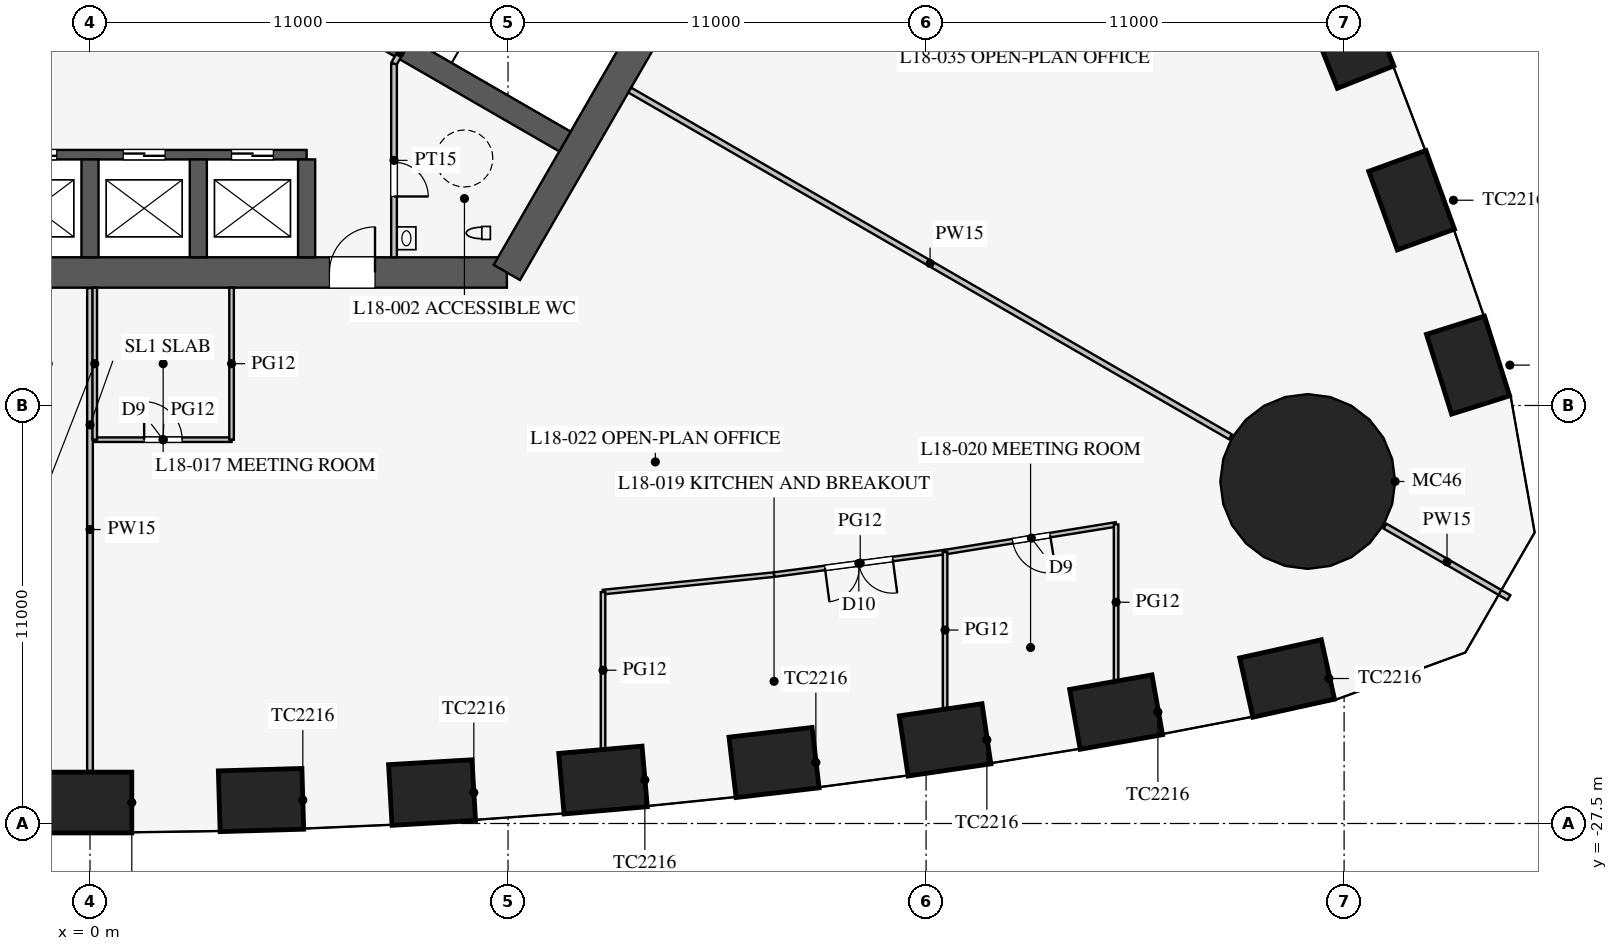
"""IFC4 building model, lengths in metres.
Left out: names, types, materials, properties, quantities, classifications, styles, units other than length and angle.
Written with IfcOpenShell. Run it as: python <this file> out.ifc"""

import sys

from ifc_helpers import new_model, si_unit, direction, frame, frame_2d, origin, origin_2d, place, context, subcontext, project, spatial, rectangle, circle, extrude, element, fill, save


model = new_model("IFC4")
c1 = context("Model", 3, precision=1e-05, world=origin(), true_north=direction((0.0, 1.0)))
c2 = subcontext(c1, "Body", "Model", "MODEL_VIEW")
j1 = project(units=[si_unit("LENGTHUNIT", "METRE"), si_unit("PLANEANGLEUNIT", "RADIAN")], contexts=[c1])
p1 = place(None, origin())
s1 = spatial("IfcSite", under=j1, at=p1, CompositionType="ELEMENT")
p2 = place(p1, origin())
s2 = spatial("IfcBuilding", under=s1, at=p2, CompositionType="ELEMENT")
p3 = place(p2, frame((0.0, 0.0, 79.5)))
s3 = spatial("IfcBuildingStorey", under=s2, at=p3, CompositionType="ELEMENT", Elevation=79.5)
for number, where, z_axis, x_axis in (
    (1, (0.0, -26.949, 0.0), (0.0, 0.0, 1.0), (1.0, 0.0, 0.0)),
    (2, (4.5, -26.883, 0.0), (0.0, 0.0, 1.0), (1.0, 0.029, 0.0)),
    (3, (9.0, -26.686, 0.0), (0.0, 0.0, 1.0), (0.998, 0.058, 0.0)),
    (4, (13.5, -26.357, 0.0), (0.0, 0.0, 1.0), (0.996, 0.087, 0.0)),
    (5, (18.0, -25.895, 0.0), (0.0, 0.0, 1.0), (0.993, 0.116, 0.0)),
    (6, (22.5, -25.299, 0.0), (0.0, 0.0, 1.0), (0.989, 0.145, 0.0)),
    (7, (27.0, -24.568, 0.0), (0.0, 0.0, 1.0), (0.985, 0.174, 0.0)),
    (8, (31.5, -23.685, 0.0), (0.0, 0.0, 1.0), (0.976, 0.217, 0.0)),
    (9, (36.262, -15.438, 0.0), (0.0, 0.0, 1.0), (-0.3, 0.954, 0.0)),
    (10, (34.776, -11.099, 0.0), (0.0, 0.0, 1.0), (-0.342, 0.94, 0.0)),
    (11, (33.16, -6.836, 0.0), (0.0, 0.0, 1.0), (-0.369, 0.929, 0.0)),
):
    element("IfcColumn", number, at=place(p3, frame(where, z_axis=z_axis, x_axis=x_axis)), inside=s3, PredefinedType="COLUMN", context=c2, shape_type="SweptSolid", body=[
        extrude(rectangle(XDim=2.2, YDim=1.6, at=origin_2d()), origin(), (0.0, 0.0, 1.0), 4.2),
    ])
p4 = place(p3, frame((32.043, -18.5, 0.0), z_axis=(0.0, 0.0, 1.0), x_axis=(1.0, 0.0, 0.0)))
e12 = element("IfcColumn", 12, at=p4, inside=s3, PredefinedType="COLUMN", context=c2, shape_type="SweptSolid", body=[
    extrude(circle(Radius=2.3, at=origin_2d()), origin(), (0.0, 0.0, 1.0), 4.2),
])
p5 = place(p3, frame((-10.97, -13.0, 0.0), z_axis=(0.0, 0.0, 1.0), x_axis=(1.0, 0.0, 0.0)))
e13 = element("IfcWall", 13, at=p5, inside=s3, PredefinedType="SHEAR", context=c2, shape_type="SweptSolid", body=[
    extrude(rectangle(XDim=21.939, YDim=0.8, at=frame_2d((10.97, 0.0))), origin(), (0.0, 0.0, 1.0), 4.2),
])
p6 = place(p5, frame((17.27, 0.0, 0.0)))
e14 = element("IfcOpeningElement", 14, at=p6, cuts=e13, PredefinedType="OPENING", context=c2, shape_type="SweptSolid", body=[
    extrude(rectangle(XDim=1.2, YDim=2.1, at=frame_2d((0.6, 1.05))), frame((0.0, 0.41, 0.0), z_axis=(0.0, -1.0, 0.0), x_axis=(1.0, 0.0, 0.0)), (0.0, 0.0, 1.0), 0.82),
])
p7 = place(p5, frame((3.47, 0.0, 0.0)))
e15 = element("IfcOpeningElement", 15, at=p7, cuts=e13, PredefinedType="OPENING", context=c2, shape_type="SweptSolid", body=[
    extrude(rectangle(XDim=1.2, YDim=2.1, at=frame_2d((0.6, 1.05))), frame((0.0, 0.41, 0.0), z_axis=(0.0, -1.0, 0.0), x_axis=(1.0, 0.0, 0.0)), (0.0, 0.0, 1.0), 0.82),
])
p8 = place(p3, frame((10.97, -13.0, 0.0), z_axis=(0.0, 0.0, 1.0), x_axis=(0.499995765644, 0.866027848477, 0.0)))
e16 = element("IfcWall", 16, at=p8, inside=s3, PredefinedType="SHEAR", context=c2, shape_type="SweptSolid", body=[
    extrude(rectangle(XDim=11.547, YDim=0.8, at=frame_2d((5.773, 0.0))), origin(), (0.0, 0.0, 1.0), 4.2),
])
p9 = place(p3, frame((-5.7, -9.9, 0.0), z_axis=(0.0, 0.0, 1.0), x_axis=(1.0, 0.0, 0.0)))
e17 = element("IfcWall", 17, at=p9, inside=s3, PredefinedType="SHEAR", context=c2, shape_type="SweptSolid", body=[
    extrude(rectangle(XDim=11.4, YDim=0.25, at=frame_2d((5.7, 0.0))), origin(), (0.0, 0.0, 1.0), 4.2),
])
p10 = place(p9, frame((0.875, 0.0, 0.0)))
e18 = element("IfcOpeningElement", 18, at=p10, cuts=e17, PredefinedType="OPENING", context=c2, shape_type="SweptSolid", body=[
    extrude(rectangle(XDim=1.1, YDim=2.2, at=frame_2d((0.55, 1.1))), frame((0.0, 0.135, 0.0), z_axis=(0.0, -1.0, 0.0), x_axis=(1.0, 0.0, 0.0)), (0.0, 0.0, 1.0), 0.27),
])
p11 = place(p9, frame((3.725, 0.0, 0.0)))
e19 = element("IfcOpeningElement", 19, at=p11, cuts=e17, PredefinedType="OPENING", context=c2, shape_type="SweptSolid", body=[
    extrude(rectangle(XDim=1.1, YDim=2.2, at=frame_2d((0.55, 1.1))), frame((0.0, 0.135, 0.0), z_axis=(0.0, -1.0, 0.0), x_axis=(1.0, 0.0, 0.0)), (0.0, 0.0, 1.0), 0.27),
])
p12 = place(p9, frame((6.575, 0.0, 0.0)))
e20 = element("IfcOpeningElement", 20, at=p12, cuts=e17, PredefinedType="OPENING", context=c2, shape_type="SweptSolid", body=[
    extrude(rectangle(XDim=1.1, YDim=2.2, at=frame_2d((0.55, 1.1))), frame((0.0, 0.135, 0.0), z_axis=(0.0, -1.0, 0.0), x_axis=(1.0, 0.0, 0.0)), (0.0, 0.0, 1.0), 0.27),
])
p13 = place(p9, frame((9.425, 0.0, 0.0)))
e21 = element("IfcOpeningElement", 21, at=p13, cuts=e17, PredefinedType="OPENING", context=c2, shape_type="SweptSolid", body=[
    extrude(rectangle(XDim=1.1, YDim=2.2, at=frame_2d((0.55, 1.1))), frame((0.0, 0.135, 0.0), z_axis=(0.0, -1.0, 0.0), x_axis=(1.0, 0.0, 0.0)), (0.0, 0.0, 1.0), 0.27),
])
for number, where, z_axis, x_axis in (
    (22, (0.0, -10.025, 0.0), (0.0, 0.0, 1.0), (0.0, -1.0, 0.0)),
    (23, (2.85, -10.025, 0.0), (0.0, 0.0, 1.0), (0.0, -1.0, 0.0)),
    (24, (5.7, -10.025, 0.0), (0.0, 0.0, 1.0), (0.0, -1.0, 0.0)),
):
    element("IfcWall", number, at=place(p3, frame(where, z_axis=z_axis, x_axis=x_axis)), inside=s3, PredefinedType="SHEAR", context=c2, shape_type="SweptSolid", body=[
        extrude(rectangle(XDim=2.575, YDim=0.45, at=frame_2d((1.288, 0.0))), origin(), (0.0, 0.0, 1.0), 4.2),
    ])
p14 = place(p3, frame((4.638, -5.016, 0.0), z_axis=(0.0, 0.0, 1.0), x_axis=(0.866019375473, -0.500010441196, 0.0)))
e25 = element("IfcWall", 25, at=p14, inside=s3, PredefinedType="SHEAR", context=c2, shape_type="SweptSolid", body=[
    extrude(rectangle(XDim=9.075, YDim=0.6, at=frame_2d((4.538, 0.0))), origin(), (0.0, 0.0, 1.0), 4.2),
])
p15 = place(p3, frame((8.0, -7.5, 0.0), z_axis=(0.0, 0.0, 1.0), x_axis=(0.0, -1.0, 0.0)))
e26 = element("IfcWall", 26, at=p15, inside=s3, PredefinedType="PARTITIONING", context=c2, shape_type="SweptSolid", body=[
    extrude(rectangle(XDim=5.1, YDim=0.15, at=frame_2d((2.55, 0.0))), origin(), (0.0, 0.0, 1.0), 4.0),
])
p16 = place(p15, frame((2.6, 0.0, 0.0)))
e27 = element("IfcOpeningElement", 27, at=p16, cuts=e26, PredefinedType="OPENING", context=c2, shape_type="SweptSolid", body=[
    extrude(rectangle(XDim=0.9, YDim=2.1, at=frame_2d((0.45, 1.05))), frame((0.0, 0.085, 0.0), z_axis=(0.0, -1.0, 0.0), x_axis=(1.0, 0.0, 0.0)), (0.0, 0.0, 1.0), 0.17),
])
p17 = place(p3, frame((8.0, -7.5, 0.0), z_axis=(0.0, 0.0, 1.0), x_axis=(0.499842556608, 0.866116284689, 0.0)))
e28 = element("IfcWall", 28, at=p17, inside=s3, PredefinedType="PARTITIONING", context=c2, shape_type="SweptSolid", body=[
    extrude(rectangle(XDim=0.645, YDim=0.15, at=frame_2d((0.323, 0.0))), origin(), (0.0, 0.0, 1.0), 4.0),
])
p18 = place(p3, frame((14.203, -8.2, 0.0), z_axis=(0.0, 0.0, 1.0), x_axis=(0.866024965723, -0.500000758745, 0.0)))
e29 = element("IfcWall", 29, at=p18, inside=s3, PredefinedType="PARTITIONING", context=c2, shape_type="SweptSolid", body=[
    extrude(rectangle(XDim=18.25, YDim=0.15, at=frame_2d((9.125, 0.0))), origin(), (0.0, 0.0, 1.0), 2.3),
])
p19 = place(p3, frame((34.078, -19.675, 0.0), z_axis=(0.0, 0.0, 1.0), x_axis=(0.866019247219, -0.500010663332, 0.0)))
e30 = element("IfcWall", 30, at=p19, inside=s3, PredefinedType="PARTITIONING", context=c2, shape_type="SweptSolid", body=[
    extrude(rectangle(XDim=3.764, YDim=0.15, at=frame_2d((1.882, 0.0))), origin(), (0.0, 0.0, 1.0), 2.3),
])
p20 = place(p3, frame((0.0, -13.41, 0.0), z_axis=(0.0, 0.0, 1.0), x_axis=(0.0, -1.0, 0.0)))
e31 = element("IfcWall", 31, at=p20, inside=s3, PredefinedType="PARTITIONING", context=c2, shape_type="SweptSolid", body=[
    extrude(rectangle(XDim=12.709, YDim=0.15, at=frame_2d((6.354, 0.0))), origin(), (0.0, 0.0, 1.0), 2.8),
])
p21 = place(p3, frame((0.125, -17.4, 0.0), z_axis=(0.0, 0.0, 1.0), x_axis=(1.0, 0.0, 0.0)))
e32 = element("IfcWall", 32, at=p21, inside=s3, PredefinedType="PARTITIONING", context=c2, shape_type="SweptSolid", body=[
    extrude(rectangle(XDim=3.6, YDim=0.12, at=frame_2d((1.8, 0.0))), origin(), (0.0, 0.0, 1.0), 2.9),
])
p22 = place(p21, frame((1.3, 0.0, 0.15)))
e33 = element("IfcOpeningElement", 33, at=p22, cuts=e32, PredefinedType="OPENING", context=c2, shape_type="SweptSolid", body=[
    extrude(rectangle(XDim=1.0, YDim=2.1, at=frame_2d((0.5, 1.05))), frame((0.0, 0.07, 0.0), z_axis=(0.0, -1.0, 0.0), x_axis=(1.0, 0.0, 0.0)), (0.0, 0.0, 1.0), 0.14),
])
p23 = place(p3, frame((0.125, -13.4, 0.0), z_axis=(0.0, 0.0, 1.0), x_axis=(0.0, -1.0, 0.0)))
e34 = element("IfcWall", 34, at=p23, inside=s3, PredefinedType="PARTITIONING", context=c2, shape_type="SweptSolid", body=[
    extrude(rectangle(XDim=4.0, YDim=0.12, at=frame_2d((2.0, 0.0))), origin(), (0.0, 0.0, 1.0), 2.8),
])
p24 = place(p3, frame((3.725, -13.4, 0.0), z_axis=(0.0, 0.0, 1.0), x_axis=(0.0, -1.0, 0.0)))
e35 = element("IfcWall", 35, at=p24, inside=s3, PredefinedType="PARTITIONING", context=c2, shape_type="SweptSolid", body=[
    extrude(rectangle(XDim=4.0, YDim=0.12, at=frame_2d((2.0, 0.0))), origin(), (0.0, 0.0, 1.0), 2.9),
])
p25 = place(p3, frame((13.5, -21.41, 0.0), z_axis=(0.0, 0.0, 1.0), x_axis=(0.994833141332, 0.101523499286, 0.0)))
e36 = element("IfcWall", 36, at=p25, inside=s3, PredefinedType="PARTITIONING", context=c2, shape_type="SweptSolid", body=[
    extrude(rectangle(XDim=4.523, YDim=0.12, at=frame_2d((2.262, 0.0))), origin(), (0.0, 0.0, 1.0), 2.9),
])
p26 = place(p3, frame((18.0, -20.951, 0.0), z_axis=(0.0, 0.0, 1.0), x_axis=(0.991435244698, 0.130599217346, 0.0)))
e37 = element("IfcWall", 37, at=p26, inside=s3, PredefinedType="PARTITIONING", context=c2, shape_type="SweptSolid", body=[
    extrude(rectangle(XDim=4.539, YDim=0.12, at=frame_2d((2.27, 0.0))), origin(), (0.0, 0.0, 1.0), 2.9),
])
p27 = place(p26, frame((1.35, 0.0, 0.15)))
e38 = element("IfcOpeningElement", 38, at=p27, cuts=e37, PredefinedType="OPENING", context=c2, shape_type="SweptSolid", body=[
    extrude(rectangle(XDim=1.8, YDim=2.1, at=frame_2d((0.9, 1.05))), frame((0.0, 0.07, 0.0), z_axis=(0.0, -1.0, 0.0), x_axis=(1.0, 0.0, 0.0)), (0.0, 0.0, 1.0), 0.14),
])
p28 = place(p3, frame((22.5, -20.358, 0.0), z_axis=(0.0, 0.0, 1.0), x_axis=(0.987181300889, 0.159602879593, 0.0)))
e39 = element("IfcWall", 39, at=p28, inside=s3, PredefinedType="PARTITIONING", context=c2, shape_type="SweptSolid", body=[
    extrude(rectangle(XDim=4.558, YDim=0.12, at=frame_2d((2.279, 0.0))), origin(), (0.0, 0.0, 1.0), 2.9),
])
p29 = place(p28, frame((1.8, 0.0, 0.15)))
e40 = element("IfcOpeningElement", 40, at=p29, cuts=e39, PredefinedType="OPENING", context=c2, shape_type="SweptSolid", body=[
    extrude(rectangle(XDim=1.0, YDim=2.1, at=frame_2d((0.5, 1.05))), frame((0.0, 0.07, 0.0), z_axis=(0.0, -1.0, 0.0), x_axis=(1.0, 0.0, 0.0)), (0.0, 0.0, 1.0), 0.14),
])
p30 = place(p3, frame((13.5, -21.41, 0.0), z_axis=(0.0, 0.0, 1.0), x_axis=(0.0, -1.0, 0.0)))
e41 = element("IfcWall", 41, at=p30, inside=s3, PredefinedType="PARTITIONING", context=c2, shape_type="SweptSolid", body=[
    extrude(rectangle(XDim=4.114, YDim=0.12, at=frame_2d((2.057, 0.0))), origin(), (0.0, 0.0, 1.0), 2.6),
])
p31 = place(p3, frame((22.5, -20.358, 0.0), z_axis=(0.0, 0.0, 1.0), x_axis=(0.0, -1.0, 0.0)))
e42 = element("IfcWall", 42, at=p31, inside=s3, PredefinedType="PARTITIONING", context=c2, shape_type="SweptSolid", body=[
    extrude(rectangle(XDim=4.103, YDim=0.12, at=frame_2d((2.051, 0.0))), origin(), (0.0, 0.0, 1.0), 2.8),
])
p32 = place(p3, frame((27.0, -19.63, 0.0), z_axis=(0.0, 0.0, 1.0), x_axis=(0.0, -1.0, 0.0)))
e43 = element("IfcWall", 43, at=p32, inside=s3, PredefinedType="PARTITIONING", context=c2, shape_type="SweptSolid", body=[
    extrude(rectangle(XDim=4.095, YDim=0.12, at=frame_2d((2.047, 0.0))), origin(), (0.0, 0.0, 1.0), 2.9),
])
p33 = place(p16, origin())
e44 = element("IfcDoor", 44, at=p33, inside=s3, OperationType="SINGLE_SWING_RIGHT", PredefinedType="DOOR", context=c2, shape_type="SweptSolid", body=[
    extrude(rectangle(XDim=0.9, YDim=2.1, at=frame_2d((0.45, 1.05))), frame((0.0, 0.025, 0.0), z_axis=(0.0, -1.0, 0.0), x_axis=(1.0, 0.0, 0.0)), (0.0, 0.0, 1.0), 0.05),
])
fill(e27, e44)
p34 = place(p6, origin())
e45 = element("IfcDoor", 45, at=p34, inside=s3, OperationType="SINGLE_SWING_RIGHT", PredefinedType="DOOR", context=c2, shape_type="SweptSolid", body=[
    extrude(rectangle(XDim=1.2, YDim=2.1, at=frame_2d((0.6, 1.05))), frame((0.0, 0.025, 0.0), z_axis=(0.0, -1.0, 0.0), x_axis=(1.0, 0.0, 0.0)), (0.0, 0.0, 1.0), 0.05),
])
fill(e14, e45)
p35 = place(p22, origin())
e46 = element("IfcDoor", 46, at=p35, inside=s3, OperationType="SINGLE_SWING_LEFT", PredefinedType="DOOR", context=c2, shape_type="SweptSolid", body=[
    extrude(rectangle(XDim=1.0, YDim=2.1, at=frame_2d((0.5, 1.05))), frame((0.0, 0.025, 0.0), z_axis=(0.0, -1.0, 0.0), x_axis=(1.0, 0.0, 0.0)), (0.0, 0.0, 1.0), 0.05),
])
fill(e33, e46)
p36 = place(p27, frame((1.8, 0.0, 0.0), z_axis=(0.0, 0.0, 1.0), x_axis=(-1.0, 0.0, 0.0)))
e47 = element("IfcDoor", 47, at=p36, inside=s3, OperationType="DOUBLE_DOOR_SINGLE_SWING", PredefinedType="DOOR", context=c2, shape_type="SweptSolid", body=[
    extrude(rectangle(XDim=1.8, YDim=2.1, at=frame_2d((0.9, 1.05))), frame((0.0, 0.025, 0.0), z_axis=(0.0, -1.0, 0.0), x_axis=(1.0, 0.0, 0.0)), (0.0, 0.0, 1.0), 0.05),
])
fill(e38, e47)
p37 = place(p29, frame((1.0, 0.0, 0.0), z_axis=(0.0, 0.0, 1.0), x_axis=(-1.0, 0.0, 0.0)))
e48 = element("IfcDoor", 48, at=p37, inside=s3, OperationType="SINGLE_SWING_LEFT", PredefinedType="DOOR", context=c2, shape_type="SweptSolid", body=[
    extrude(rectangle(XDim=1.0, YDim=2.1, at=frame_2d((0.5, 1.05))), frame((0.0, 0.025, 0.0), z_axis=(0.0, -1.0, 0.0), x_axis=(1.0, 0.0, 0.0)), (0.0, 0.0, 1.0), 0.05),
])
fill(e40, e48)
p38 = place(p11, origin())
e49 = element("IfcDoor", 49, at=p38, inside=s3, OperationType="DOUBLE_DOOR_SLIDING", PredefinedType="DOOR", context=c2, shape_type="SweptSolid", body=[
    extrude(rectangle(XDim=1.1, YDim=2.2, at=frame_2d((0.55, 1.1))), frame((0.0, 0.025, 0.0), z_axis=(0.0, -1.0, 0.0), x_axis=(1.0, 0.0, 0.0)), (0.0, 0.0, 1.0), 0.05),
])
fill(e19, e49)
p39 = place(p12, origin())
e50 = element("IfcDoor", 50, at=p39, inside=s3, OperationType="DOUBLE_DOOR_SLIDING", PredefinedType="DOOR", context=c2, shape_type="SweptSolid", body=[
    extrude(rectangle(XDim=1.1, YDim=2.2, at=frame_2d((0.55, 1.1))), frame((0.0, 0.025, 0.0), z_axis=(0.0, -1.0, 0.0), x_axis=(1.0, 0.0, 0.0)), (0.0, 0.0, 1.0), 0.05),
])
fill(e20, e50)
p40 = place(p13, origin())
e51 = element("IfcDoor", 51, at=p40, inside=s3, OperationType="DOUBLE_DOOR_SLIDING", PredefinedType="DOOR", context=c2, shape_type="SweptSolid", body=[
    extrude(rectangle(XDim=1.1, YDim=2.2, at=frame_2d((0.55, 1.1))), frame((0.0, 0.025, 0.0), z_axis=(0.0, -1.0, 0.0), x_axis=(1.0, 0.0, 0.0)), (0.0, 0.0, 1.0), 0.05),
])
fill(e21, e51)
save(model, sys.argv[1])
